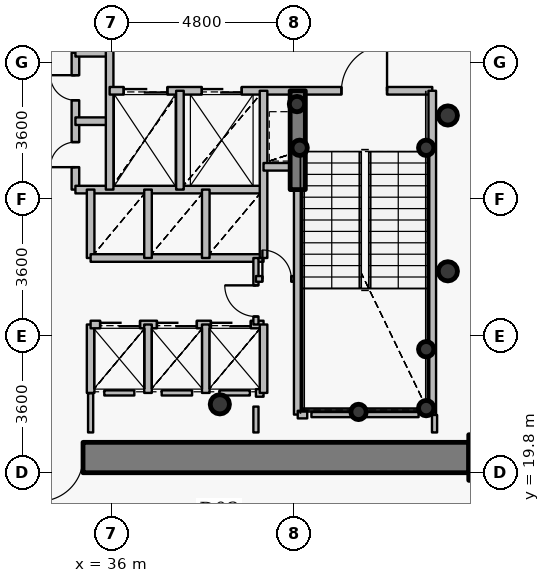
"""IFC4 building model, lengths in metres.
Left out: names, types, materials, properties, quantities, classifications, styles, units other than length and angle.
Written with IfcOpenShell. Run it as: python <this file> out.ifc"""

import sys

from ifc_helpers import new_model, si_unit, direction, frame, frame_2d, origin, origin_2d, place, context, subcontext, project, spatial, rectangle, hollow_circle, extrude, source, transform, mapped, element, fill, save


model = new_model("IFC4")
c1 = context("Model", 3, precision=1e-05, world=origin(), true_north=direction((0.0, 1.0)))
c2 = subcontext(c1, "Body", "Model", "MODEL_VIEW")
j1 = project(units=[si_unit("LENGTHUNIT", "METRE"), si_unit("PLANEANGLEUNIT", "RADIAN")], contexts=[c1])
p1 = place(None, origin())
s1 = spatial("IfcSite", under=j1, at=p1, CompositionType="ELEMENT")
p2 = place(p1, origin())
s2 = spatial("IfcBuilding", under=s1, at=p2, CompositionType="ELEMENT")
p3 = place(p2, frame((0.0, 0.0, 119.7)))
s3 = spatial("IfcBuildingStorey", under=s2, at=p3, CompositionType="ELEMENT", Elevation=119.7)
p4 = place(p3, frame((46.0, 20.2, 0.0), z_axis=(0.0, 0.0, 1.0), x_axis=(1.0, 0.0, 0.0)))
e1 = element("IfcColumn", 1, at=p4, inside=s3, PredefinedType="COLUMN", context=c2, shape_type="SweptSolid", body=[
    extrude(rectangle(XDim=1.2, YDim=1.2, at=origin_2d()), origin(), (0.0, 0.0, 1.0), 3.75),
])
p5 = place(p3, frame((38.85, 21.6, 0.0), z_axis=(0.0, 0.0, 1.0), x_axis=(1.0, 0.0, 0.0)))
e2 = element("IfcColumn", 2, at=p5, inside=s3, PredefinedType="COLUMN", context=c2, shape_type="SweptSolid", body=[
    extrude(hollow_circle(Radius=0.254, WallThickness=0.02, at=origin_2d()), origin(), (0.0, 0.0, 1.0), 3.75),
])
for number, where, z_axis, x_axis in (
    (3, (44.28, 21.5, 0.0), (0.0, 0.0, 1.0), (1.0, 0.0, 0.0)),
    (4, (44.28, 23.05, 0.0), (0.0, 0.0, 1.0), (1.0, 0.0, 0.0)),
    (5, (42.5, 21.4, 0.0), (0.0, 0.0, 1.0), (1.0, 0.0, 0.0)),
    (6, (40.95, 28.35, 0.0), (0.0, 0.0, 1.0), (1.0, 0.0, 0.0)),
    (7, (44.28, 28.35, 0.0), (0.0, 0.0, 1.0), (1.0, 0.0, 0.0)),
    (8, (40.88, 29.5, 0.0), (0.0, 0.0, 1.0), (1.0, 0.0, 0.0)),
):
    element("IfcColumn", number, at=place(p3, frame(where, z_axis=z_axis, x_axis=x_axis)), inside=s3, PredefinedType="COLUMN", context=c2, shape_type="SweptSolid", body=[
        extrude(hollow_circle(Radius=0.203, WallThickness=0.016, at=origin_2d()), origin(), (0.0, 0.0, 1.0), 3.75),
    ])
p6 = place(p3, frame((45.4, 20.2, 0.0), z_axis=(0.0, 0.0, 1.0), x_axis=(-1.0, 0.0, 0.0)))
e9 = element("IfcWall", 9, at=p6, inside=s3, PredefinedType="SHEAR", context=c2, shape_type="SweptSolid", body=[
    extrude(rectangle(XDim=18.8, YDim=0.8, at=frame_2d((9.4, 0.0))), origin(), (0.0, 0.0, 1.0), 2.95),
])
p7 = place(p6, frame((10.15, 0.0, 0.0)))
e10 = element("IfcOpeningElement", 10, at=p7, cuts=e9, PredefinedType="OPENING", context=c2, shape_type="SweptSolid", body=[
    extrude(rectangle(XDim=1.15, YDim=2.15, at=origin_2d()), frame((0.575, 0.41, 1.075), z_axis=(0.0, -1.0, 0.0), x_axis=(1.0, 0.0, 0.0)), (0.0, 0.0, 1.0), 0.82),
])
p8 = place(p3, frame((40.9, 27.25, 0.0), z_axis=(0.0, 0.0, 1.0), x_axis=(0.0, 1.0, 0.0)))
e11 = element("IfcWall", 11, at=p8, inside=s3, PredefinedType="SHEAR", context=c2, shape_type="SweptSolid", body=[
    extrude(rectangle(XDim=2.6, YDim=0.4, at=frame_2d((1.3, 0.0))), origin(), (0.0, 0.0, 1.0), 3.1),
])
for number, where, z_axis, x_axis in (
    (12, (44.85, 25.1, 0.0), (0.0, 0.0, 1.0), (1.0, 0.0, 0.0)),
    (13, (44.85, 29.2, 0.0), (0.0, 0.0, 1.0), (1.0, 0.0, 0.0)),
):
    element("IfcColumn", number, at=place(p3, frame(where, z_axis=z_axis, x_axis=x_axis)), inside=s3, PredefinedType="COLUMN", context=c2, shape_type="SweptSolid", body=[
        extrude(hollow_circle(Radius=0.254, WallThickness=0.02, at=origin_2d()), origin(), (0.0, 0.0, 1.0), 3.75),
    ])
p9 = place(p3, frame((35.05, 27.25, 0.0), z_axis=(0.0, 0.0, 1.0), x_axis=(0.0, 1.0, 0.0)))
e14 = element("IfcWall", 14, at=p9, inside=s3, PredefinedType="PARTITIONING", context=c2, shape_type="SweptSolid", body=[
    extrude(rectangle(XDim=3.6, YDim=0.2, at=frame_2d((1.8, 0.0))), origin(), (0.0, 0.0, 1.0), 3.5),
])
p10 = place(p9, frame((0.59, 0.0, 0.0)))
e15 = element("IfcOpeningElement", 15, at=p10, cuts=e14, PredefinedType="OPENING", context=c2, shape_type="SweptSolid", body=[
    extrude(rectangle(XDim=0.66, YDim=2.05, at=origin_2d()), frame((0.33, 0.11, 1.025), z_axis=(0.0, -1.0, 0.0), x_axis=(1.0, 0.0, 0.0)), (0.0, 0.0, 1.0), 0.22),
])
p11 = place(p9, frame((2.35, 0.0, 0.0)))
e16 = element("IfcOpeningElement", 16, at=p11, cuts=e14, PredefinedType="OPENING", context=c2, shape_type="SweptSolid", body=[
    extrude(rectangle(XDim=0.66, YDim=2.05, at=origin_2d()), frame((0.33, 0.11, 1.025), z_axis=(0.0, -1.0, 0.0), x_axis=(1.0, 0.0, 0.0)), (0.0, 0.0, 1.0), 0.22),
])
p12 = place(p3, frame((35.05, 27.25, 0.0), z_axis=(0.0, 0.0, 1.0), x_axis=(1.0, 0.0, 0.0)))
e17 = element("IfcWall", 17, at=p12, inside=s3, PredefinedType="PARTITIONING", context=c2, shape_type="SweptSolid", body=[
    extrude(rectangle(XDim=4.95, YDim=0.2, at=frame_2d((2.475, 0.0))), origin(), (0.0, 0.0, 1.0), 3.085),
])
for number, where, z_axis, x_axis in (
    (18, (35.05, 29.05, 0.0), (0.0, 0.0, 1.0), (1.0, 0.0, 0.0)),
    (19, (35.05, 30.85, 0.0), (0.0, 0.0, 1.0), (1.0, 0.0, 0.0)),
):
    element("IfcWall", number, at=place(p3, frame(where, z_axis=z_axis, x_axis=x_axis)), inside=s3, PredefinedType="PARTITIONING", context=c2, shape_type="SweptSolid", body=[
        extrude(rectangle(XDim=0.9, YDim=0.2, at=frame_2d((0.45, 0.0))), origin(), (0.0, 0.0, 1.0), 3.5),
    ])
p13 = place(p3, frame((35.45, 21.9, 0.0), z_axis=(0.0, 0.0, 1.0), x_axis=(0.0, 1.0, 0.0)))
e20 = element("IfcWall", 20, at=p13, inside=s3, PredefinedType="PARTITIONING", context=c2, shape_type="SweptSolid", body=[
    extrude(rectangle(XDim=1.8, YDim=0.2, at=frame_2d((0.9, 0.0))), origin(), (0.0, 0.0, 1.0), 3.5),
])
p14 = place(p3, frame((35.45, 23.7, 0.0), z_axis=(0.0, 0.0, 1.0), x_axis=(1.0, 0.0, 0.0)))
e21 = element("IfcWall", 21, at=p14, inside=s3, PredefinedType="PARTITIONING", context=c2, shape_type="SweptSolid", body=[
    extrude(rectangle(XDim=4.55, YDim=0.2, at=frame_2d((2.275, 0.0))), origin(), (0.0, 0.0, 1.0), 3.085),
])
p15 = place(p14, frame((0.25, 0.0, 0.0)))
e22 = element("IfcOpeningElement", 22, at=p15, cuts=e21, PredefinedType="OPENING", context=c2, shape_type="SweptSolid", body=[
    extrude(rectangle(XDim=1.05, YDim=2.15, at=origin_2d()), frame((0.525, 0.11, 1.075), z_axis=(0.0, -1.0, 0.0), x_axis=(1.0, 0.0, 0.0)), (0.0, 0.0, 1.0), 0.22),
])
p16 = place(p14, frame((1.745, 0.0, 0.0)))
e23 = element("IfcOpeningElement", 23, at=p16, cuts=e21, PredefinedType="OPENING", context=c2, shape_type="SweptSolid", body=[
    extrude(rectangle(XDim=1.05, YDim=2.15, at=origin_2d()), frame((0.525, 0.11, 1.075), z_axis=(0.0, -1.0, 0.0), x_axis=(1.0, 0.0, 0.0)), (0.0, 0.0, 1.0), 0.22),
])
p17 = place(p14, frame((3.165, 0.0, 0.0)))
e24 = element("IfcOpeningElement", 24, at=p17, cuts=e21, PredefinedType="OPENING", context=c2, shape_type="SweptSolid", body=[
    extrude(rectangle(XDim=1.05, YDim=2.15, at=origin_2d()), frame((0.525, 0.11, 1.075), z_axis=(0.0, -1.0, 0.0), x_axis=(1.0, 0.0, 0.0)), (0.0, 0.0, 1.0), 0.22),
])
p18 = place(p3, frame((35.45, 25.45, 0.0), z_axis=(0.0, 0.0, 1.0), x_axis=(0.0, 1.0, 0.0)))
e25 = element("IfcWall", 25, at=p18, inside=s3, PredefinedType="PARTITIONING", context=c2, shape_type="SweptSolid", body=[
    extrude(rectangle(XDim=1.8, YDim=0.2, at=frame_2d((0.9, 0.0))), origin(), (0.0, 0.0, 1.0), 3.5),
])
p19 = place(p3, frame((35.45, 25.45, 0.0), z_axis=(0.0, 0.0, 1.0), x_axis=(1.0, 0.0, 0.0)))
e26 = element("IfcWall", 26, at=p19, inside=s3, PredefinedType="PARTITIONING", context=c2, shape_type="SweptSolid", body=[
    extrude(rectangle(XDim=4.55, YDim=0.2, at=frame_2d((2.275, 0.0))), origin(), (0.0, 0.0, 1.0), 3.085),
])
p20 = place(p3, frame((35.95, 27.25, 0.0), z_axis=(0.0, 0.0, 1.0), x_axis=(0.0, 1.0, 0.0)))
e27 = element("IfcWall", 27, at=p20, inside=s3, PredefinedType="PARTITIONING", context=c2, shape_type="SweptSolid", body=[
    extrude(rectangle(XDim=3.8, YDim=0.2, at=frame_2d((1.9, 0.0))), origin(), (0.0, 0.0, 1.0), 3.5),
])
p21 = place(p3, frame((35.95, 29.85, 0.0), z_axis=(0.0, 0.0, 1.0), x_axis=(1.0, 0.0, 0.0)))
e28 = element("IfcWall", 28, at=p21, inside=s3, PredefinedType="PARTITIONING", context=c2, shape_type="SweptSolid", body=[
    extrude(rectangle(XDim=8.49, YDim=0.2, at=frame_2d((4.245, 0.0))), origin(), (0.0, 0.0, 1.0), 3.085),
])
p22 = place(p21, frame((6.1, 0.0, 0.0)))
e29 = element("IfcOpeningElement", 29, at=p22, cuts=e28, PredefinedType="OPENING", context=c2, shape_type="SweptSolid", body=[
    extrude(rectangle(XDim=1.2, YDim=2.15, at=origin_2d()), frame((0.6, 0.11, 1.075), z_axis=(0.0, -1.0, 0.0), x_axis=(1.0, 0.0, 0.0)), (0.0, 0.0, 1.0), 0.22),
])
p23 = place(p21, frame((0.37, 0.0, 0.0)))
e30 = element("IfcOpeningElement", 30, at=p23, cuts=e28, PredefinedType="OPENING", context=c2, shape_type="SweptSolid", body=[
    extrude(rectangle(XDim=1.15, YDim=2.15, at=origin_2d()), frame((0.575, 0.11, 1.075), z_axis=(0.0, -1.0, 0.0), x_axis=(1.0, 0.0, 0.0)), (0.0, 0.0, 1.0), 0.22),
])
p24 = place(p21, frame((2.425, 0.0, 0.0)))
e31 = element("IfcOpeningElement", 31, at=p24, cuts=e28, PredefinedType="OPENING", context=c2, shape_type="SweptSolid", body=[
    extrude(rectangle(XDim=1.05, YDim=2.15, at=origin_2d()), frame((0.525, 0.11, 1.075), z_axis=(0.0, -1.0, 0.0), x_axis=(1.0, 0.0, 0.0)), (0.0, 0.0, 1.0), 0.22),
])
for number, where, z_axis, x_axis in (
    (32, (36.96, 21.9, 0.0), (0.0, 0.0, 1.0), (0.0, 1.0, 0.0)),
    (33, (36.96, 25.45, 0.0), (0.0, 0.0, 1.0), (0.0, 1.0, 0.0)),
):
    element("IfcWall", number, at=place(p3, frame(where, z_axis=z_axis, x_axis=x_axis)), inside=s3, PredefinedType="PARTITIONING", context=c2, shape_type="SweptSolid", body=[
        extrude(rectangle(XDim=1.8, YDim=0.2, at=frame_2d((0.9, 0.0))), origin(), (0.0, 0.0, 1.0), 3.5),
    ])
p25 = place(p3, frame((37.8, 27.25, 0.0), z_axis=(0.0, 0.0, 1.0), x_axis=(0.0, 1.0, 0.0)))
e34 = element("IfcWall", 34, at=p25, inside=s3, PredefinedType="PARTITIONING", context=c2, shape_type="SweptSolid", body=[
    extrude(rectangle(XDim=2.6, YDim=0.2, at=frame_2d((1.3, 0.0))), origin(), (0.0, 0.0, 1.0), 3.5),
])
for number, where, z_axis, x_axis in (
    (35, (38.48, 21.9, 0.0), (0.0, 0.0, 1.0), (0.0, 1.0, 0.0)),
    (36, (38.48, 25.45, 0.0), (0.0, 0.0, 1.0), (0.0, 1.0, 0.0)),
):
    element("IfcWall", number, at=place(p3, frame(where, z_axis=z_axis, x_axis=x_axis)), inside=s3, PredefinedType="PARTITIONING", context=c2, shape_type="SweptSolid", body=[
        extrude(rectangle(XDim=1.8, YDim=0.2, at=frame_2d((0.9, 0.0))), origin(), (0.0, 0.0, 1.0), 3.5),
    ])
p26 = place(p3, frame((39.8, 21.9, 0.0), z_axis=(0.0, 0.0, 1.0), x_axis=(1.0, 0.0, 0.0)))
e37 = element("IfcWall", 37, at=p26, inside=s3, PredefinedType="PARTITIONING", context=c2, shape_type="SweptSolid", body=[
    extrude(rectangle(XDim=0.2, YDim=0.2, at=frame_2d((0.1, 0.0))), origin(), (0.0, 0.0, 1.0), 3.5),
])
p27 = place(p3, frame((39.8, 23.7, 0.0), z_axis=(0.0, 0.0, 1.0), x_axis=(0.0, 1.0, 0.0)))
e38 = element("IfcWall", 38, at=p27, inside=s3, PredefinedType="PARTITIONING", context=c2, shape_type="SweptSolid", body=[
    extrude(rectangle(XDim=1.75, YDim=0.135, at=frame_2d((0.875, 0.0))), origin(), (0.0, 0.0, 1.0), 3.5),
])
p28 = place(p27, frame((0.21, 0.0, 0.0)))
e39 = element("IfcOpeningElement", 39, at=p28, cuts=e38, PredefinedType="OPENING", context=c2, shape_type="SweptSolid", body=[
    extrude(rectangle(XDim=0.82, YDim=2.1, at=origin_2d()), frame((0.41, 0.078, 1.05), z_axis=(0.0, -1.0, 0.0), x_axis=(1.0, 0.0, 0.0)), (0.0, 0.0, 1.0), 0.155),
])
p29 = place(p3, frame((39.8, 24.9, 0.0), z_axis=(0.0, 0.0, 1.0), x_axis=(1.0, 0.0, 0.0)))
e40 = element("IfcWall", 40, at=p29, inside=s3, PredefinedType="PARTITIONING", context=c2, shape_type="SweptSolid", body=[
    extrude(rectangle(XDim=1.1, YDim=0.15, at=frame_2d((0.55, 0.0))), origin(), (0.0, 0.0, 1.0), 3.5),
])
p30 = place(p29, frame((0.17, 0.0, 0.0)))
e41 = element("IfcOpeningElement", 41, at=p30, cuts=e40, PredefinedType="OPENING", context=c2, shape_type="SweptSolid", body=[
    extrude(rectangle(XDim=0.76, YDim=2.1, at=origin_2d()), frame((0.38, 0.085, 1.05), z_axis=(0.0, -1.0, 0.0), x_axis=(1.0, 0.0, 0.0)), (0.0, 0.0, 1.0), 0.17),
])
p31 = place(p3, frame((40.0, 21.9, 0.0), z_axis=(0.0, 0.0, 1.0), x_axis=(0.0, 1.0, 0.0)))
e42 = element("IfcWall", 42, at=p31, inside=s3, PredefinedType="PARTITIONING", context=c2, shape_type="SweptSolid", body=[
    extrude(rectangle(XDim=1.8, YDim=0.2, at=frame_2d((0.9, 0.0))), origin(), (0.0, 0.0, 1.0), 3.5),
])
p32 = place(p3, frame((40.0, 25.45, 0.0), z_axis=(0.0, 0.0, 1.0), x_axis=(0.0, 1.0, 0.0)))
e43 = element("IfcWall", 43, at=p32, inside=s3, PredefinedType="PARTITIONING", context=c2, shape_type="SweptSolid", body=[
    extrude(rectangle(XDim=4.4, YDim=0.2, at=frame_2d((2.2, 0.0))), origin(), (0.0, 0.0, 1.0), 3.5),
])
p33 = place(p3, frame((40.0, 27.85, 0.0), z_axis=(0.0, 0.0, 1.0), x_axis=(1.0, 0.0, 0.0)))
e44 = element("IfcWall", 44, at=p33, inside=s3, PredefinedType="PARTITIONING", context=c2, shape_type="SweptSolid", body=[
    extrude(rectangle(XDim=0.9, YDim=0.2, at=frame_2d((0.45, 0.0))), origin(), (0.0, 0.0, 1.0), 3.5),
])
p34 = place(p3, frame((40.9, 21.33, 0.0), z_axis=(0.0, 0.0, 1.0), x_axis=(0.0, 1.0, 0.0)))
e45 = element("IfcWall", 45, at=p34, inside=s3, PredefinedType="PARTITIONING", context=c2, shape_type="SweptSolid", body=[
    extrude(rectangle(XDim=5.91, YDim=0.2, at=frame_2d((2.955, 0.0))), origin(), (0.0, 0.0, 1.0), 3.035),
])
p35 = place(p3, frame((40.9, 21.33, 0.0), z_axis=(0.0, 0.0, 1.0), x_axis=(1.0, 0.0, 0.0)))
e46 = element("IfcWall", 46, at=p35, inside=s3, PredefinedType="PARTITIONING", context=c2, shape_type="SweptSolid", body=[
    extrude(rectangle(XDim=0.25, YDim=0.2, at=frame_2d((0.125, 0.0))), origin(), (0.0, 0.0, 1.0), 3.035),
])
p36 = place(p3, frame((44.44, 21.33, 0.0), z_axis=(0.0, 0.0, 1.0), x_axis=(0.0, 1.0, 0.0)))
e47 = element("IfcWall", 47, at=p36, inside=s3, PredefinedType="PARTITIONING", context=c2, shape_type="SweptSolid", body=[
    extrude(rectangle(XDim=8.52, YDim=0.2, at=frame_2d((4.26, 0.0))), origin(), (0.0, 0.0, 1.0), 3.5),
])
p37 = place(p3, frame((44.08, 21.33, 0.0), z_axis=(0.0, 0.0, 1.0), x_axis=(-1.0, 0.0, 0.0)))
e48 = element("IfcWall", 48, at=p37, inside=s3, PredefinedType="PARTITIONING", context=c2, shape_type="SweptSolid", body=[
    extrude(rectangle(XDim=2.82, YDim=0.135, at=frame_2d((1.41, 0.0))), origin(), (0.0, 0.0, 1.0), 3.035),
])
p38 = place(p3, frame((36.6, 21.9, 0.0), z_axis=(0.0, 0.0, 1.0), x_axis=(-1.0, 0.0, 0.0)))
e49 = element("IfcWall", 49, at=p38, inside=s3, PredefinedType="PARTITIONING", context=c2, shape_type="SweptSolid", body=[
    extrude(rectangle(XDim=0.79, YDim=0.135, at=frame_2d((0.395, 0.0))), origin(), (0.0, 0.0, 1.0), 3.5),
])
p39 = place(p3, frame((38.12, 21.9, 0.0), z_axis=(0.0, 0.0, 1.0), x_axis=(-1.0, 0.0, 0.0)))
e50 = element("IfcWall", 50, at=p39, inside=s3, PredefinedType="PARTITIONING", context=c2, shape_type="SweptSolid", body=[
    extrude(rectangle(XDim=0.8, YDim=0.135, at=frame_2d((0.4, 0.0))), origin(), (0.0, 0.0, 1.0), 3.5),
])
p40 = place(p3, frame((39.64, 21.9, 0.0), z_axis=(0.0, 0.0, 1.0), x_axis=(-1.0, 0.0, 0.0)))
e51 = element("IfcWall", 51, at=p40, inside=s3, PredefinedType="PARTITIONING", context=c2, shape_type="SweptSolid", body=[
    extrude(rectangle(XDim=0.8, YDim=0.135, at=frame_2d((0.4, 0.0))), origin(), (0.0, 0.0, 1.0), 3.085),
])
p41 = place(p3, frame((39.8, 20.86, 0.0), z_axis=(0.0, 0.0, 1.0), x_axis=(0.0, 1.0, 0.0)))
e52 = element("IfcWall", 52, at=p41, inside=s3, PredefinedType="PARTITIONING", context=c2, shape_type="SweptSolid", body=[
    extrude(rectangle(XDim=0.68, YDim=0.135, at=frame_2d((0.34, 0.0))), origin(), (0.0, 0.0, 1.0), 3.035),
])
p42 = place(p3, frame((44.5, 20.86, 0.0), z_axis=(0.0, 0.0, 1.0), x_axis=(0.0, 1.0, 0.0)))
e53 = element("IfcWall", 53, at=p42, inside=s3, PredefinedType="PARTITIONING", context=c2, shape_type="SweptSolid", body=[
    extrude(rectangle(XDim=0.46, YDim=0.135, at=frame_2d((0.23, 0.0))), origin(), (0.0, 0.0, 1.0), 3.5),
])
p43 = place(p3, frame((35.45, 21.89, 0.0), z_axis=(0.0, 0.0, 1.0), x_axis=(0.0, -1.0, 0.0)))
e54 = element("IfcWall", 54, at=p43, inside=s3, PredefinedType="PARTITIONING", context=c2, shape_type="SweptSolid", body=[
    extrude(rectangle(XDim=1.03, YDim=0.135, at=frame_2d((0.515, 0.0))), origin(), (0.0, 0.0, 1.0), 3.085),
])
p44 = place(p3, frame((45.41, 19.8, 0.0), z_axis=(0.0, 0.0, 1.0), x_axis=(1.0, 0.0, 0.0)))
e55 = element("IfcWall", 55, at=p44, inside=s3, PredefinedType="PARTITIONING", context=c2, shape_type="SweptSolid", body=[
    extrude(rectangle(XDim=0.99, YDim=0.135, at=frame_2d((0.495, 0.0))), origin(), (0.0, 0.0, 1.0), 2.935),
])
m1 = source(origin(), c2, "Body", "SweptSolid", [
    extrude(rectangle(XDim=1.15, YDim=2.15, at=origin_2d()), frame((0.575, 0.025, 1.075), z_axis=(0.0, -1.0, 0.0), x_axis=(1.0, 0.0, 0.0)), (0.0, 0.0, 1.0), 0.05),
])
p45 = place(p7, origin())
e56 = element("IfcDoor", 56, at=p45, inside=s3, OperationType="SINGLE_SWING_RIGHT", PredefinedType="DOOR", context=c2, shape_type="MappedRepresentation", body=[
    mapped(m1, transform((0.0, 0.0, 0.0), x_axis=(1.0, 0.0, 0.0), y_axis=(0.0, 1.0, 0.0), z_axis=(0.0, 0.0, 1.0), scale=1.0)),
])
fill(e10, e56)
m2 = source(origin(), c2, "Body", "SweptSolid", [
    extrude(rectangle(XDim=1.2, YDim=2.15, at=origin_2d()), frame((0.6, 0.025, 1.075), z_axis=(0.0, -1.0, 0.0), x_axis=(1.0, 0.0, 0.0)), (0.0, 0.0, 1.0), 0.05),
])
p46 = place(p22, origin())
e57 = element("IfcDoor", 57, at=p46, inside=s3, OperationType="SINGLE_SWING_RIGHT", PredefinedType="DOOR", context=c2, shape_type="MappedRepresentation", body=[
    mapped(m2, transform((0.0, 0.0, 0.0), x_axis=(1.0, 0.0, 0.0), y_axis=(0.0, 1.0, 0.0), z_axis=(0.0, 0.0, 1.0), scale=1.0)),
])
fill(e29, e57)
m3 = source(origin(), c2, "Body", "SweptSolid", [
    extrude(rectangle(XDim=1.15, YDim=2.15, at=origin_2d()), frame((0.575, 0.025, 1.075), z_axis=(0.0, -1.0, 0.0), x_axis=(1.0, 0.0, 0.0)), (0.0, 0.0, 1.0), 0.05),
])
p47 = place(p23, origin())
e58 = element("IfcDoor", 58, at=p47, inside=s3, OperationType="DOUBLE_DOOR_SLIDING", PredefinedType="USERDEFINED", context=c2, shape_type="MappedRepresentation", body=[
    mapped(m3, transform((0.0, 0.0, 0.0), x_axis=(1.0, 0.0, 0.0), y_axis=(0.0, 1.0, 0.0), z_axis=(0.0, 0.0, 1.0), scale=1.0)),
])
fill(e30, e58)
m4 = source(origin(), c2, "Body", "SweptSolid", [
    extrude(rectangle(XDim=1.05, YDim=2.15, at=origin_2d()), frame((0.525, 0.025, 1.075), z_axis=(0.0, -1.0, 0.0), x_axis=(1.0, 0.0, 0.0)), (0.0, 0.0, 1.0), 0.05),
])
p48 = place(p24, origin())
e59 = element("IfcDoor", 59, at=p48, inside=s3, OperationType="DOUBLE_DOOR_SLIDING", PredefinedType="USERDEFINED", context=c2, shape_type="MappedRepresentation", body=[
    mapped(m4, transform((0.0, 0.0, 0.0), x_axis=(1.0, 0.0, 0.0), y_axis=(0.0, 1.0, 0.0), z_axis=(0.0, 0.0, 1.0), scale=1.0)),
])
fill(e31, e59)
p49 = place(p15, origin())
e60 = element("IfcDoor", 60, at=p49, inside=s3, OperationType="DOUBLE_DOOR_SLIDING", PredefinedType="USERDEFINED", context=c2, shape_type="MappedRepresentation", body=[
    mapped(m4, transform((0.0, 0.0, 0.0), x_axis=(1.0, 0.0, 0.0), y_axis=(0.0, 1.0, 0.0), z_axis=(0.0, 0.0, 1.0), scale=1.0)),
])
fill(e22, e60)
p50 = place(p16, origin())
e61 = element("IfcDoor", 61, at=p50, inside=s3, OperationType="DOUBLE_DOOR_SLIDING", PredefinedType="USERDEFINED", context=c2, shape_type="MappedRepresentation", body=[
    mapped(m4, transform((0.0, 0.0, 0.0), x_axis=(1.0, 0.0, 0.0), y_axis=(0.0, 1.0, 0.0), z_axis=(0.0, 0.0, 1.0), scale=1.0)),
])
fill(e23, e61)
p51 = place(p17, origin())
e62 = element("IfcDoor", 62, at=p51, inside=s3, OperationType="DOUBLE_DOOR_SLIDING", PredefinedType="USERDEFINED", context=c2, shape_type="MappedRepresentation", body=[
    mapped(m4, transform((0.0, 0.0, 0.0), x_axis=(1.0, 0.0, 0.0), y_axis=(0.0, 1.0, 0.0), z_axis=(0.0, 0.0, 1.0), scale=1.0)),
])
fill(e24, e62)
m5 = source(origin(), c2, "Body", "SweptSolid", [
    extrude(rectangle(XDim=0.66, YDim=2.05, at=origin_2d()), frame((0.33, 0.025, 1.025), z_axis=(0.0, -1.0, 0.0), x_axis=(1.0, 0.0, 0.0)), (0.0, 0.0, 1.0), 0.05),
])
p52 = place(p10, origin())
e63 = element("IfcDoor", 63, at=p52, inside=s3, OperationType="SINGLE_SWING_LEFT", PredefinedType="USERDEFINED", context=c2, shape_type="MappedRepresentation", body=[
    mapped(m5, transform((0.0, 0.0, 0.0), x_axis=(1.0, 0.0, 0.0), y_axis=(0.0, 1.0, 0.0), z_axis=(0.0, 0.0, 1.0), scale=1.0)),
])
fill(e15, e63)
p53 = place(p11, origin())
e64 = element("IfcDoor", 64, at=p53, inside=s3, OperationType="SINGLE_SWING_RIGHT", PredefinedType="USERDEFINED", context=c2, shape_type="MappedRepresentation", body=[
    mapped(m5, transform((0.0, 0.0, 0.0), x_axis=(1.0, 0.0, 0.0), y_axis=(0.0, 1.0, 0.0), z_axis=(0.0, 0.0, 1.0), scale=1.0)),
])
fill(e16, e64)
m6 = source(origin(), c2, "Body", "SweptSolid", [
    extrude(rectangle(XDim=0.82, YDim=2.1, at=origin_2d()), frame((0.41, 0.025, 1.05), z_axis=(0.0, -1.0, 0.0), x_axis=(1.0, 0.0, 0.0)), (0.0, 0.0, 1.0), 0.05),
])
p54 = place(p28, origin())
e65 = element("IfcDoor", 65, at=p54, inside=s3, OperationType="SINGLE_SWING_RIGHT", PredefinedType="DOOR", context=c2, shape_type="MappedRepresentation", body=[
    mapped(m6, transform((0.0, 0.0, 0.0), x_axis=(1.0, 0.0, 0.0), y_axis=(0.0, 1.0, 0.0), z_axis=(0.0, 0.0, 1.0), scale=1.0)),
])
fill(e39, e65)
m7 = source(origin(), c2, "Body", "SweptSolid", [
    extrude(rectangle(XDim=0.76, YDim=2.1, at=origin_2d()), frame((0.38, 0.025, 1.05), z_axis=(0.0, -1.0, 0.0), x_axis=(1.0, 0.0, 0.0)), (0.0, 0.0, 1.0), 0.05),
])
p55 = place(p30, origin())
e66 = element("IfcDoor", 66, at=p55, inside=s3, OperationType="SINGLE_SWING_LEFT", PredefinedType="DOOR", context=c2, shape_type="MappedRepresentation", body=[
    mapped(m7, transform((0.0, 0.0, 0.0), x_axis=(1.0, 0.0, 0.0), y_axis=(0.0, 1.0, 0.0), z_axis=(0.0, 0.0, 1.0), scale=1.0)),
])
fill(e41, e66)
save(model, sys.argv[1])
